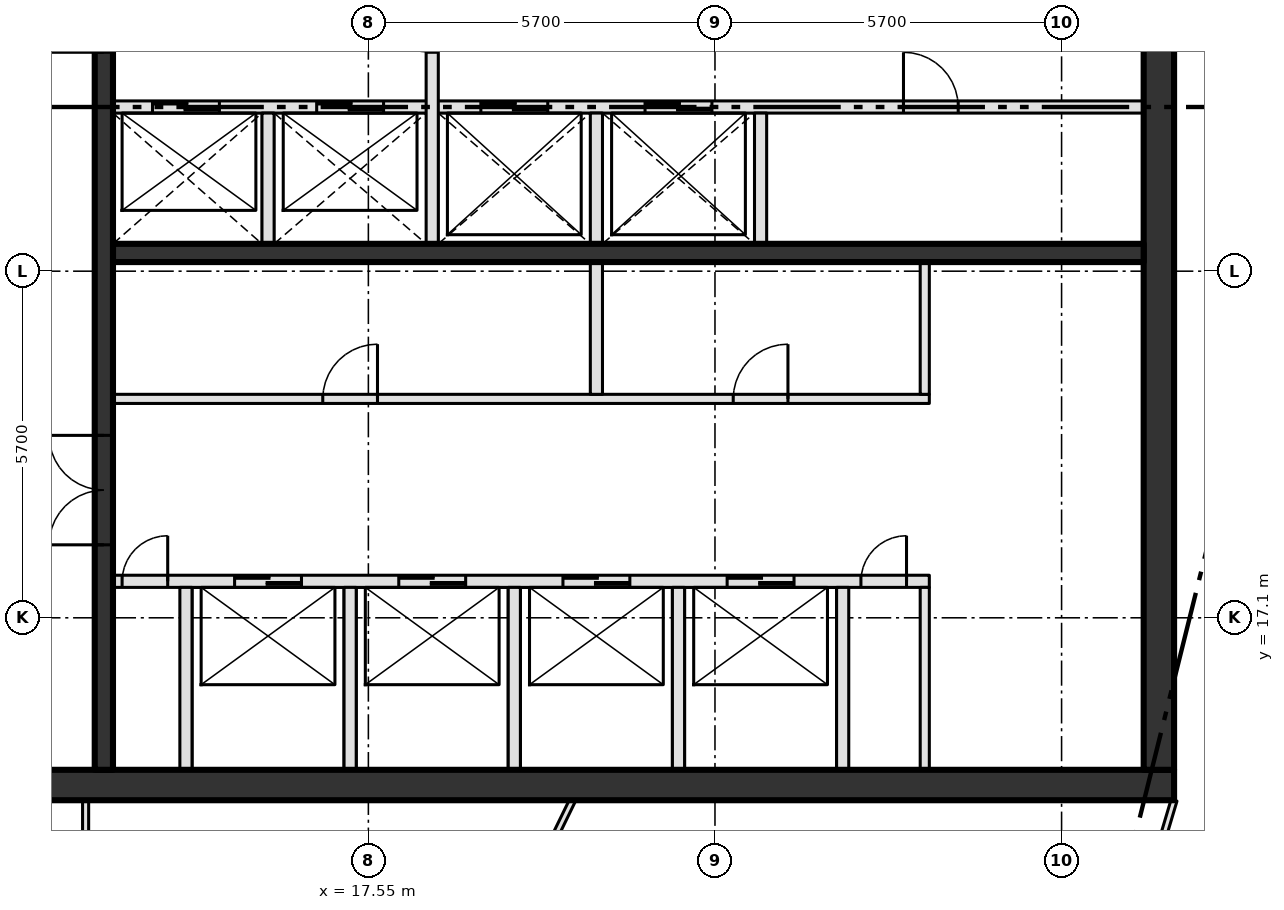
"""IFC4 building model, lengths in metres.
Left out: names, types, materials, properties, quantities, classifications, styles, units other than length and angle.
Written with IfcOpenShell. Run it as: python <this file> out.ifc"""

import sys

from ifc_helpers import new_model, si_unit, direction, frame, frame_2d, origin, place, context, subcontext, project, spatial, rectangle, extrude, element, fill, save


model = new_model("IFC4")
c1 = context("Model", 3, precision=1e-05, world=origin(), true_north=direction((0.0, 1.0)))
c2 = subcontext(c1, "Body", "Model", "MODEL_VIEW")
j1 = project(units=[si_unit("LENGTHUNIT", "METRE"), si_unit("PLANEANGLEUNIT", "RADIAN")], contexts=[c1])
p1 = place(None, origin())
s1 = spatial("IfcSite", under=j1, at=p1, CompositionType="ELEMENT")
p2 = place(p1, origin())
s2 = spatial("IfcBuilding", under=s1, at=p2, CompositionType="ELEMENT")
p3 = place(p2, frame((0.0, 0.0, 375.0)))
s3 = spatial("IfcBuildingStorey", under=s2, at=p3, CompositionType="ELEMENT", Elevation=375.0)
p4 = place(p3, frame((8.0, 14.35, -0.3), z_axis=(0.0, 0.0, 1.0), x_axis=(1.0, 0.0, 0.0)))
e1 = element("IfcWall", 1, at=p4, inside=s3, PredefinedType="SHEAR", context=c2, shape_type="SweptSolid", body=[
    extrude(rectangle(XDim=22.8, YDim=0.5, at=frame_2d((11.4, 0.0))), origin(), (0.0, 0.0, 1.0), 4.2),
])
p5 = place(p4, frame((2.3, 0.0, 0.3)))
e2 = element("IfcOpeningElement", 2, at=p5, cuts=e1, PredefinedType="OPENING", context=c2, shape_type="SweptSolid", body=[
    extrude(rectangle(XDim=1.8, YDim=2.1, at=frame_2d((0.9, 1.05))), frame((0.0, 0.26, 0.0), z_axis=(0.0, -1.0, 0.0), x_axis=(1.0, 0.0, 0.0)), (0.0, 0.0, 1.0), 0.52),
])
p6 = place(p3, frame((30.55, 14.6, -0.3), z_axis=(0.0, 0.0, 1.0), x_axis=(0.0, 1.0, 0.0)))
e3 = element("IfcWall", 3, at=p6, inside=s3, PredefinedType="SHEAR", context=c2, shape_type="SweptSolid", body=[
    extrude(rectangle(XDim=21.1, YDim=0.5, at=frame_2d((10.55, 0.0))), origin(), (0.0, 0.0, 1.0), 4.2),
])
p7 = place(p3, frame((13.35, 17.7, 0.0), z_axis=(0.0, 0.0, 1.0), x_axis=(1.0, 0.0, 0.0)))
e4 = element("IfcWall", 4, at=p7, inside=s3, PredefinedType="SOLIDWALL", context=c2, shape_type="SweptSolid", body=[
    extrude(rectangle(XDim=13.425, YDim=0.2, at=frame_2d((6.712, 0.0))), origin(), (0.0, 0.0, 1.0), 3.9),
])
p8 = place(p7, frame((2.0, 0.0, 0.0)))
e5 = element("IfcOpeningElement", 5, at=p8, cuts=e4, PredefinedType="OPENING", context=c2, shape_type="SweptSolid", body=[
    extrude(rectangle(XDim=1.1, YDim=2.1, at=frame_2d((0.55, 1.05))), frame((0.0, 0.11, 0.0), z_axis=(0.0, -1.0, 0.0), x_axis=(1.0, 0.0, 0.0)), (0.0, 0.0, 1.0), 0.22),
])
p9 = place(p7, frame((4.7, 0.0, 0.0)))
e6 = element("IfcOpeningElement", 6, at=p9, cuts=e4, PredefinedType="OPENING", context=c2, shape_type="SweptSolid", body=[
    extrude(rectangle(XDim=1.1, YDim=2.1, at=frame_2d((0.55, 1.05))), frame((0.0, 0.11, 0.0), z_axis=(0.0, -1.0, 0.0), x_axis=(1.0, 0.0, 0.0)), (0.0, 0.0, 1.0), 0.22),
])
p10 = place(p7, frame((7.4, 0.0, 0.0)))
e7 = element("IfcOpeningElement", 7, at=p10, cuts=e4, PredefinedType="OPENING", context=c2, shape_type="SweptSolid", body=[
    extrude(rectangle(XDim=1.1, YDim=2.1, at=frame_2d((0.55, 1.05))), frame((0.0, 0.11, 0.0), z_axis=(0.0, -1.0, 0.0), x_axis=(1.0, 0.0, 0.0)), (0.0, 0.0, 1.0), 0.22),
])
p11 = place(p7, frame((10.1, 0.0, 0.0)))
e8 = element("IfcOpeningElement", 8, at=p11, cuts=e4, PredefinedType="OPENING", context=c2, shape_type="SweptSolid", body=[
    extrude(rectangle(XDim=1.1, YDim=2.1, at=frame_2d((0.55, 1.05))), frame((0.0, 0.11, 0.0), z_axis=(0.0, -1.0, 0.0), x_axis=(1.0, 0.0, 0.0)), (0.0, 0.0, 1.0), 0.22),
])
p12 = place(p7, frame((0.15, 0.0, 0.0)))
e9 = element("IfcOpeningElement", 9, at=p12, cuts=e4, PredefinedType="OPENING", context=c2, shape_type="SweptSolid", body=[
    extrude(rectangle(XDim=0.75, YDim=2.1, at=frame_2d((0.375, 1.05))), frame((0.0, 0.11, 0.0), z_axis=(0.0, -1.0, 0.0), x_axis=(1.0, 0.0, 0.0)), (0.0, 0.0, 1.0), 0.22),
])
p13 = place(p7, frame((12.3, 0.0, 0.0)))
e10 = element("IfcOpeningElement", 10, at=p13, cuts=e4, PredefinedType="OPENING", context=c2, shape_type="SweptSolid", body=[
    extrude(rectangle(XDim=0.75, YDim=2.1, at=frame_2d((0.375, 1.05))), frame((0.0, 0.11, 0.0), z_axis=(0.0, -1.0, 0.0), x_axis=(1.0, 0.0, 0.0)), (0.0, 0.0, 1.0), 0.22),
])
p14 = place(p3, frame((13.35, 20.7, 0.0), z_axis=(0.0, 0.0, 1.0), x_axis=(1.0, 0.0, 0.0)))
e11 = element("IfcWall", 11, at=p14, inside=s3, PredefinedType="PARTITIONING", context=c2, shape_type="SweptSolid", body=[
    extrude(rectangle(XDim=13.425, YDim=0.15, at=frame_2d((6.712, 0.0))), origin(), (0.0, 0.0, 1.0), 3.9),
])
p15 = place(p14, frame((3.45, 0.0, 0.0)))
e12 = element("IfcOpeningElement", 12, at=p15, cuts=e11, PredefinedType="OPENING", context=c2, shape_type="SweptSolid", body=[
    extrude(rectangle(XDim=0.9, YDim=2.1, at=frame_2d((0.45, 1.05))), frame((0.0, 0.085, 0.0), z_axis=(0.0, -1.0, 0.0), x_axis=(1.0, 0.0, 0.0)), (0.0, 0.0, 1.0), 0.17),
])
p16 = place(p14, frame((10.2, 0.0, 0.0)))
e13 = element("IfcOpeningElement", 13, at=p16, cuts=e11, PredefinedType="OPENING", context=c2, shape_type="SweptSolid", body=[
    extrude(rectangle(XDim=0.9, YDim=2.1, at=frame_2d((0.45, 1.05))), frame((0.0, 0.085, 0.0), z_axis=(0.0, -1.0, 0.0), x_axis=(1.0, 0.0, 0.0)), (0.0, 0.0, 1.0), 0.17),
])
p17 = place(p3, frame((13.35, 23.1, 0.0), z_axis=(0.0, 0.0, 1.0), x_axis=(1.0, 0.0, 0.0)))
e14 = element("IfcWall", 14, at=p17, inside=s3, PredefinedType="SHEAR", context=c2, shape_type="SweptSolid", body=[
    extrude(rectangle(XDim=16.95, YDim=0.3, at=frame_2d((8.475, 0.0))), origin(), (0.0, 0.0, 1.0), 3.9),
])
p18 = place(p3, frame((13.35, 25.5, 0.0), z_axis=(0.0, 0.0, 1.0), x_axis=(1.0, 0.0, 0.0)))
e15 = element("IfcWall", 15, at=p18, inside=s3, PredefinedType="SOLIDWALL", context=c2, shape_type="SweptSolid", body=[
    extrude(rectangle(XDim=16.95, YDim=0.2, at=frame_2d((8.475, 0.0))), origin(), (0.0, 0.0, 1.0), 3.9),
])
p19 = place(p18, frame((0.65, 0.0, 0.0)))
e16 = element("IfcOpeningElement", 16, at=p19, cuts=e15, PredefinedType="OPENING", context=c2, shape_type="SweptSolid", body=[
    extrude(rectangle(XDim=1.1, YDim=2.1, at=frame_2d((0.55, 1.05))), frame((0.0, 0.11, 0.0), z_axis=(0.0, -1.0, 0.0), x_axis=(1.0, 0.0, 0.0)), (0.0, 0.0, 1.0), 0.22),
])
p20 = place(p18, frame((3.35, 0.0, 0.0)))
e17 = element("IfcOpeningElement", 17, at=p20, cuts=e15, PredefinedType="OPENING", context=c2, shape_type="SweptSolid", body=[
    extrude(rectangle(XDim=1.1, YDim=2.1, at=frame_2d((0.55, 1.05))), frame((0.0, 0.11, 0.0), z_axis=(0.0, -1.0, 0.0), x_axis=(1.0, 0.0, 0.0)), (0.0, 0.0, 1.0), 0.22),
])
p21 = place(p18, frame((6.05, 0.0, 0.0)))
e18 = element("IfcOpeningElement", 18, at=p21, cuts=e15, PredefinedType="OPENING", context=c2, shape_type="SweptSolid", body=[
    extrude(rectangle(XDim=1.1, YDim=2.1, at=frame_2d((0.55, 1.05))), frame((0.0, 0.11, 0.0), z_axis=(0.0, -1.0, 0.0), x_axis=(1.0, 0.0, 0.0)), (0.0, 0.0, 1.0), 0.22),
])
p22 = place(p18, frame((8.75, 0.0, 0.0)))
e19 = element("IfcOpeningElement", 19, at=p22, cuts=e15, PredefinedType="OPENING", context=c2, shape_type="SweptSolid", body=[
    extrude(rectangle(XDim=1.1, YDim=2.1, at=frame_2d((0.55, 1.05))), frame((0.0, 0.11, 0.0), z_axis=(0.0, -1.0, 0.0), x_axis=(1.0, 0.0, 0.0)), (0.0, 0.0, 1.0), 0.22),
])
p23 = place(p18, frame((13.0, 0.0, 0.0)))
e20 = element("IfcOpeningElement", 20, at=p23, cuts=e15, PredefinedType="OPENING", context=c2, shape_type="SweptSolid", body=[
    extrude(rectangle(XDim=0.9, YDim=2.1, at=frame_2d((0.45, 1.05))), frame((0.0, 0.11, 0.0), z_axis=(0.0, -1.0, 0.0), x_axis=(1.0, 0.0, 0.0)), (0.0, 0.0, 1.0), 0.22),
])
p24 = place(p3, frame((13.2, 14.6, 0.0), z_axis=(0.0, 0.0, 1.0), x_axis=(0.0, 1.0, 0.0)))
e21 = element("IfcWall", 21, at=p24, inside=s3, PredefinedType="SHEAR", context=c2, shape_type="SweptSolid", body=[
    extrude(rectangle(XDim=21.1, YDim=0.3, at=frame_2d((10.55, 0.0))), origin(), (0.0, 0.0, 1.0), 3.9),
])
p25 = place(p24, frame((3.7, 0.0, 0.0)))
e22 = element("IfcOpeningElement", 22, at=p25, cuts=e21, PredefinedType="OPENING", context=c2, shape_type="SweptSolid", body=[
    extrude(rectangle(XDim=1.8, YDim=2.1, at=frame_2d((0.9, 1.05))), frame((0.0, 0.16, 0.0), z_axis=(0.0, -1.0, 0.0), x_axis=(1.0, 0.0, 0.0)), (0.0, 0.0, 1.0), 0.32),
])
p26 = place(p24, frame((11.8, 0.0, 0.0)))
e23 = element("IfcOpeningElement", 23, at=p26, cuts=e21, PredefinedType="OPENING", context=c2, shape_type="SweptSolid", body=[
    extrude(rectangle(XDim=1.2, YDim=2.1, at=frame_2d((0.6, 1.05))), frame((0.0, 0.16, 0.0), z_axis=(0.0, -1.0, 0.0), x_axis=(1.0, 0.0, 0.0)), (0.0, 0.0, 1.0), 0.32),
])
p27 = place(p3, frame((14.55, 14.6, 0.0), z_axis=(0.0, 0.0, 1.0), x_axis=(0.0, 1.0, 0.0)))
e24 = element("IfcWall", 24, at=p27, inside=s3, PredefinedType="SOLIDWALL", context=c2, shape_type="SweptSolid", body=[
    extrude(rectangle(XDim=3.0, YDim=0.2, at=frame_2d((1.5, 0.0))), origin(), (0.0, 0.0, 1.0), 3.9),
])
p28 = place(p3, frame((15.9, 23.25, 0.0), z_axis=(0.0, 0.0, 1.0), x_axis=(0.0, 1.0, 0.0)))
e25 = element("IfcWall", 25, at=p28, inside=s3, PredefinedType="SOLIDWALL", context=c2, shape_type="SweptSolid", body=[
    extrude(rectangle(XDim=2.15, YDim=0.2, at=frame_2d((1.075, 0.0))), origin(), (0.0, 0.0, 1.0), 3.9),
])
p29 = place(p3, frame((17.25, 14.6, 0.0), z_axis=(0.0, 0.0, 1.0), x_axis=(0.0, 1.0, 0.0)))
e26 = element("IfcWall", 26, at=p29, inside=s3, PredefinedType="SOLIDWALL", context=c2, shape_type="SweptSolid", body=[
    extrude(rectangle(XDim=3.0, YDim=0.2, at=frame_2d((1.5, 0.0))), origin(), (0.0, 0.0, 1.0), 3.9),
])
p30 = place(p3, frame((18.6, 23.25, 0.0), z_axis=(0.0, 0.0, 1.0), x_axis=(0.0, 1.0, 0.0)))
e27 = element("IfcWall", 27, at=p30, inside=s3, PredefinedType="SOLIDWALL", context=c2, shape_type="SweptSolid", body=[
    extrude(rectangle(XDim=5.15, YDim=0.2, at=frame_2d((2.575, 0.0))), origin(), (0.0, 0.0, 1.0), 3.9),
])
p31 = place(p30, frame((3.15, 0.0, 0.0)))
e28 = element("IfcOpeningElement", 28, at=p31, cuts=e27, PredefinedType="OPENING", context=c2, shape_type="SweptSolid", body=[
    extrude(rectangle(XDim=1.2, YDim=2.1, at=frame_2d((0.6, 1.05))), frame((0.0, 0.11, 0.0), z_axis=(0.0, -1.0, 0.0), x_axis=(1.0, 0.0, 0.0)), (0.0, 0.0, 1.0), 0.22),
])
p32 = place(p3, frame((19.95, 14.6, 0.0), z_axis=(0.0, 0.0, 1.0), x_axis=(0.0, 1.0, 0.0)))
e29 = element("IfcWall", 29, at=p32, inside=s3, PredefinedType="SOLIDWALL", context=c2, shape_type="SweptSolid", body=[
    extrude(rectangle(XDim=3.0, YDim=0.2, at=frame_2d((1.5, 0.0))), origin(), (0.0, 0.0, 1.0), 3.9),
])
p33 = place(p3, frame((21.3, 20.775, 0.0), z_axis=(0.0, 0.0, 1.0), x_axis=(0.0, 1.0, 0.0)))
e30 = element("IfcWall", 30, at=p33, inside=s3, PredefinedType="SOLIDWALL", context=c2, shape_type="SweptSolid", body=[
    extrude(rectangle(XDim=4.625, YDim=0.2, at=frame_2d((2.312, 0.0))), origin(), (0.0, 0.0, 1.0), 3.9),
])
p34 = place(p3, frame((22.65, 14.6, 0.0), z_axis=(0.0, 0.0, 1.0), x_axis=(0.0, 1.0, 0.0)))
e31 = element("IfcWall", 31, at=p34, inside=s3, PredefinedType="SOLIDWALL", context=c2, shape_type="SweptSolid", body=[
    extrude(rectangle(XDim=3.0, YDim=0.2, at=frame_2d((1.5, 0.0))), origin(), (0.0, 0.0, 1.0), 3.9),
])
p35 = place(p3, frame((24.0, 23.25, 0.0), z_axis=(0.0, 0.0, 1.0), x_axis=(0.0, 1.0, 0.0)))
e32 = element("IfcWall", 32, at=p35, inside=s3, PredefinedType="SOLIDWALL", context=c2, shape_type="SweptSolid", body=[
    extrude(rectangle(XDim=2.15, YDim=0.2, at=frame_2d((1.075, 0.0))), origin(), (0.0, 0.0, 1.0), 3.9),
])
p36 = place(p3, frame((25.35, 14.6, 0.0), z_axis=(0.0, 0.0, 1.0), x_axis=(0.0, 1.0, 0.0)))
e33 = element("IfcWall", 33, at=p36, inside=s3, PredefinedType="SOLIDWALL", context=c2, shape_type="SweptSolid", body=[
    extrude(rectangle(XDim=3.0, YDim=0.2, at=frame_2d((1.5, 0.0))), origin(), (0.0, 0.0, 1.0), 3.9),
])
p37 = place(p3, frame((26.7, 14.6, 0.0), z_axis=(0.0, 0.0, 1.0), x_axis=(0.0, 1.0, 0.0)))
e34 = element("IfcWall", 34, at=p37, inside=s3, PredefinedType="PARTITIONING", context=c2, shape_type="SweptSolid", body=[
    extrude(rectangle(XDim=3.0, YDim=0.15, at=frame_2d((1.5, 0.0))), origin(), (0.0, 0.0, 1.0), 3.9),
])
p38 = place(p3, frame((26.7, 20.775, 0.0), z_axis=(0.0, 0.0, 1.0), x_axis=(0.0, 1.0, 0.0)))
e35 = element("IfcWall", 35, at=p38, inside=s3, PredefinedType="PARTITIONING", context=c2, shape_type="SweptSolid", body=[
    extrude(rectangle(XDim=2.175, YDim=0.15, at=frame_2d((1.087, 0.0))), origin(), (0.0, 0.0, 1.0), 3.9),
])
p39 = place(p3, frame((12.9, 10.078, 0.0), z_axis=(0.0, 0.0, 1.0), x_axis=(0.0, 1.0, 0.0)))
e36 = element("IfcWall", 36, at=p39, inside=s3, PredefinedType="PARTITIONING", context=c2, shape_type="SweptSolid", body=[
    extrude(rectangle(XDim=4.022, YDim=0.1, at=frame_2d((2.011, 0.0))), origin(), (0.0, 0.0, 1.0), 3.9),
])
p40 = place(p3, frame((28.306, 5.749, 0.0), z_axis=(0.0, 0.0, 1.0), x_axis=(0.286170650389, 0.958178667502, 0.0)))
e37 = element("IfcWall", 37, at=p40, inside=s3, PredefinedType="PARTITIONING", context=c2, shape_type="SweptSolid", body=[
    extrude(rectangle(XDim=8.716, YDim=0.1, at=frame_2d((4.358, 0.0))), origin(), (0.0, 0.0, 1.0), 3.9),
])
p41 = place(p40, frame((1.43, 0.0, 0.0)))
e38 = element("IfcOpeningElement", 38, at=p41, cuts=e37, PredefinedType="OPENING", context=c2, shape_type="SweptSolid", body=[
    extrude(rectangle(XDim=1.0, YDim=2.1, at=frame_2d((0.5, 1.05))), frame((0.0, 0.06, 0.0), z_axis=(0.0, -1.0, 0.0), x_axis=(1.0, 0.0, 0.0)), (0.0, 0.0, 1.0), 0.12),
])
p42 = place(p3, frame((18.105, 8.354, 0.0), z_axis=(0.0, 0.0, 1.0), x_axis=(0.438424384383, 0.898768078638, 0.0)))
e39 = element("IfcWall", 39, at=p42, inside=s3, PredefinedType="PARTITIONING", context=c2, shape_type="SweptSolid", body=[
    extrude(rectangle(XDim=6.393, YDim=0.1, at=frame_2d((3.197, 0.0))), origin(), (0.0, 0.0, 1.0), 3.9),
])
p43 = place(p8, origin())
e40 = element("IfcDoor", 40, at=p43, inside=s3, OperationType="SLIDING_TO_LEFT", PredefinedType="DOOR", context=c2, shape_type="SweptSolid", body=[
    extrude(rectangle(XDim=1.1, YDim=2.1, at=frame_2d((0.55, 1.05))), frame((0.0, 0.025, 0.0), z_axis=(0.0, -1.0, 0.0), x_axis=(1.0, 0.0, 0.0)), (0.0, 0.0, 1.0), 0.05),
])
fill(e5, e40)
p44 = place(p9, origin())
e41 = element("IfcDoor", 41, at=p44, inside=s3, OperationType="SLIDING_TO_LEFT", PredefinedType="DOOR", context=c2, shape_type="SweptSolid", body=[
    extrude(rectangle(XDim=1.1, YDim=2.1, at=frame_2d((0.55, 1.05))), frame((0.0, 0.025, 0.0), z_axis=(0.0, -1.0, 0.0), x_axis=(1.0, 0.0, 0.0)), (0.0, 0.0, 1.0), 0.05),
])
fill(e6, e41)
p45 = place(p10, origin())
e42 = element("IfcDoor", 42, at=p45, inside=s3, OperationType="SLIDING_TO_LEFT", PredefinedType="DOOR", context=c2, shape_type="SweptSolid", body=[
    extrude(rectangle(XDim=1.1, YDim=2.1, at=frame_2d((0.55, 1.05))), frame((0.0, 0.025, 0.0), z_axis=(0.0, -1.0, 0.0), x_axis=(1.0, 0.0, 0.0)), (0.0, 0.0, 1.0), 0.05),
])
fill(e7, e42)
p46 = place(p11, origin())
e43 = element("IfcDoor", 43, at=p46, inside=s3, OperationType="SLIDING_TO_LEFT", PredefinedType="DOOR", context=c2, shape_type="SweptSolid", body=[
    extrude(rectangle(XDim=1.1, YDim=2.1, at=frame_2d((0.55, 1.05))), frame((0.0, 0.025, 0.0), z_axis=(0.0, -1.0, 0.0), x_axis=(1.0, 0.0, 0.0)), (0.0, 0.0, 1.0), 0.05),
])
fill(e8, e43)
p47 = place(p19, origin())
e44 = element("IfcDoor", 44, at=p47, inside=s3, OperationType="SLIDING_TO_LEFT", PredefinedType="DOOR", context=c2, shape_type="SweptSolid", body=[
    extrude(rectangle(XDim=1.1, YDim=2.1, at=frame_2d((0.55, 1.05))), frame((0.0, 0.025, 0.0), z_axis=(0.0, -1.0, 0.0), x_axis=(1.0, 0.0, 0.0)), (0.0, 0.0, 1.0), 0.05),
])
fill(e16, e44)
p48 = place(p20, origin())
e45 = element("IfcDoor", 45, at=p48, inside=s3, OperationType="SLIDING_TO_LEFT", PredefinedType="DOOR", context=c2, shape_type="SweptSolid", body=[
    extrude(rectangle(XDim=1.1, YDim=2.1, at=frame_2d((0.55, 1.05))), frame((0.0, 0.025, 0.0), z_axis=(0.0, -1.0, 0.0), x_axis=(1.0, 0.0, 0.0)), (0.0, 0.0, 1.0), 0.05),
])
fill(e17, e45)
p49 = place(p21, origin())
e46 = element("IfcDoor", 46, at=p49, inside=s3, OperationType="SLIDING_TO_LEFT", PredefinedType="DOOR", context=c2, shape_type="SweptSolid", body=[
    extrude(rectangle(XDim=1.1, YDim=2.1, at=frame_2d((0.55, 1.05))), frame((0.0, 0.025, 0.0), z_axis=(0.0, -1.0, 0.0), x_axis=(1.0, 0.0, 0.0)), (0.0, 0.0, 1.0), 0.05),
])
fill(e18, e46)
p50 = place(p22, origin())
e47 = element("IfcDoor", 47, at=p50, inside=s3, OperationType="SLIDING_TO_LEFT", PredefinedType="DOOR", context=c2, shape_type="SweptSolid", body=[
    extrude(rectangle(XDim=1.1, YDim=2.1, at=frame_2d((0.55, 1.05))), frame((0.0, 0.025, 0.0), z_axis=(0.0, -1.0, 0.0), x_axis=(1.0, 0.0, 0.0)), (0.0, 0.0, 1.0), 0.05),
])
fill(e19, e47)
p51 = place(p12, origin())
e48 = element("IfcDoor", 48, at=p51, inside=s3, OperationType="SINGLE_SWING_RIGHT", PredefinedType="DOOR", context=c2, shape_type="SweptSolid", body=[
    extrude(rectangle(XDim=0.75, YDim=2.1, at=frame_2d((0.375, 1.05))), frame((0.0, 0.025, 0.0), z_axis=(0.0, -1.0, 0.0), x_axis=(1.0, 0.0, 0.0)), (0.0, 0.0, 1.0), 0.05),
])
fill(e9, e48)
p52 = place(p13, origin())
e49 = element("IfcDoor", 49, at=p52, inside=s3, OperationType="SINGLE_SWING_RIGHT", PredefinedType="DOOR", context=c2, shape_type="SweptSolid", body=[
    extrude(rectangle(XDim=0.75, YDim=2.1, at=frame_2d((0.375, 1.05))), frame((0.0, 0.025, 0.0), z_axis=(0.0, -1.0, 0.0), x_axis=(1.0, 0.0, 0.0)), (0.0, 0.0, 1.0), 0.05),
])
fill(e10, e49)
p53 = place(p15, origin())
e50 = element("IfcDoor", 50, at=p53, inside=s3, OperationType="SINGLE_SWING_RIGHT", PredefinedType="DOOR", context=c2, shape_type="SweptSolid", body=[
    extrude(rectangle(XDim=0.9, YDim=2.1, at=frame_2d((0.45, 1.05))), frame((0.0, 0.025, 0.0), z_axis=(0.0, -1.0, 0.0), x_axis=(1.0, 0.0, 0.0)), (0.0, 0.0, 1.0), 0.05),
])
fill(e12, e50)
p54 = place(p16, origin())
e51 = element("IfcDoor", 51, at=p54, inside=s3, OperationType="SINGLE_SWING_RIGHT", PredefinedType="DOOR", context=c2, shape_type="SweptSolid", body=[
    extrude(rectangle(XDim=0.9, YDim=2.1, at=frame_2d((0.45, 1.05))), frame((0.0, 0.025, 0.0), z_axis=(0.0, -1.0, 0.0), x_axis=(1.0, 0.0, 0.0)), (0.0, 0.0, 1.0), 0.05),
])
fill(e13, e51)
p55 = place(p23, origin())
e52 = element("IfcDoor", 52, at=p55, inside=s3, OperationType="SINGLE_SWING_LEFT", PredefinedType="DOOR", context=c2, shape_type="SweptSolid", body=[
    extrude(rectangle(XDim=0.9, YDim=2.1, at=frame_2d((0.45, 1.05))), frame((0.0, 0.025, 0.0), z_axis=(0.0, -1.0, 0.0), x_axis=(1.0, 0.0, 0.0)), (0.0, 0.0, 1.0), 0.05),
])
fill(e20, e52)
p56 = place(p25, origin())
e53 = element("IfcDoor", 53, at=p56, inside=s3, OperationType="DOUBLE_DOOR_SINGLE_SWING", PredefinedType="DOOR", context=c2, shape_type="SweptSolid", body=[
    extrude(rectangle(XDim=1.8, YDim=2.1, at=frame_2d((0.9, 1.05))), frame((0.0, 0.025, 0.0), z_axis=(0.0, -1.0, 0.0), x_axis=(1.0, 0.0, 0.0)), (0.0, 0.0, 1.0), 0.05),
])
fill(e22, e53)
save(model, sys.argv[1])
